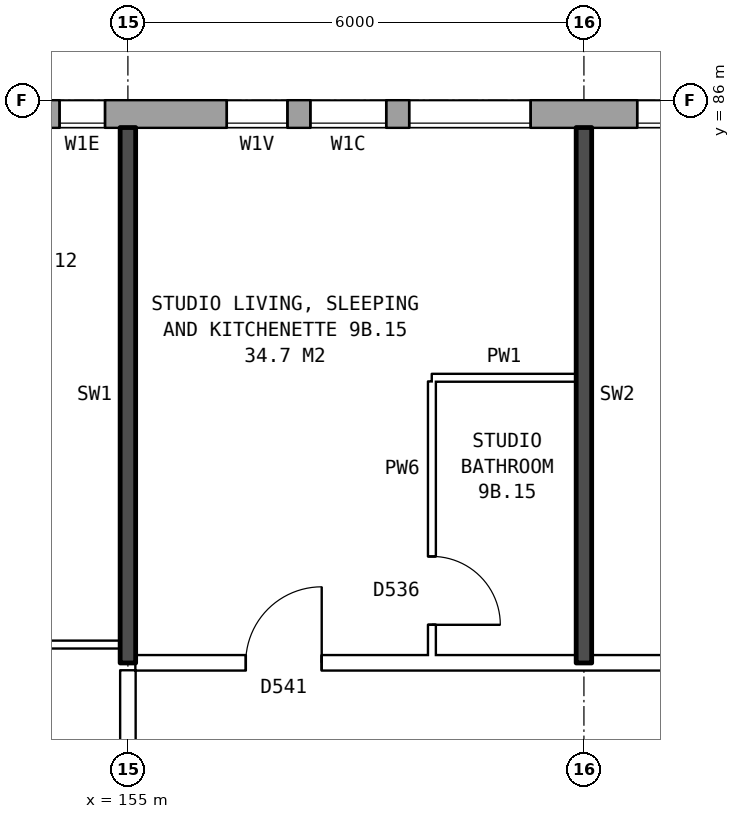
"""IFC4 building model, lengths in metres.
Left out: names, types, materials, properties, quantities, classifications, styles, units other than length and angle.
Written with IfcOpenShell. Run it as: python <this file> out.ifc"""

import sys

from ifc_helpers import new_model, si_unit, direction, frame, frame_2d, origin, place, context, subcontext, project, spatial, rectangle, extrude, element, fill, save


model = new_model("IFC4")
c1 = context("Model", 3, precision=1e-05, world=origin(), true_north=direction((0.0, 1.0)))
c2 = subcontext(c1, "Body", "Model", "MODEL_VIEW")
j1 = project(units=[si_unit("LENGTHUNIT", "METRE"), si_unit("PLANEANGLEUNIT", "RADIAN")], contexts=[c1])
p1 = place(None, origin())
s1 = spatial("IfcSite", under=j1, at=p1, CompositionType="ELEMENT")
p2 = place(p1, origin())
s2 = spatial("IfcBuilding", under=s1, at=p2, CompositionType="ELEMENT")
p3 = place(p2, frame((0.0, 0.0, 35.0)))
s3 = spatial("IfcBuildingStorey", under=s2, at=p3, CompositionType="ELEMENT", Elevation=35.0)
p4 = place(p3, frame((174.675, 85.82, 0.0), z_axis=(0.0, 0.0, 1.0), x_axis=(-1.0, 0.0, 0.0)))
e1 = element("IfcWall", 1, at=p4, inside=s3, PredefinedType="STANDARD", context=c2, shape_type="SweptSolid", body=[
    extrude(rectangle(XDim=40.601, YDim=0.36, at=frame_2d((20.3, 0.0))), origin(), (0.0, 0.0, 1.0), 2.85),
])
p5 = place(p4, frame((2.375, 0.0, 0.8)))
e2 = element("IfcOpeningElement", 2, at=p5, cuts=e1, PredefinedType="OPENING", context=c2, shape_type="SweptSolid", body=[
    extrude(rectangle(XDim=1.6, YDim=1.8, at=frame_2d((0.8, 0.9))), frame((0.0, 0.19, 0.0), z_axis=(0.0, -1.0, 0.0), x_axis=(1.0, 0.0, 0.0)), (0.0, 0.0, 1.0), 0.38),
])
p6 = place(p4, frame((5.375, 0.0, 0.8)))
e3 = element("IfcOpeningElement", 3, at=p6, cuts=e1, PredefinedType="OPENING", context=c2, shape_type="SweptSolid", body=[
    extrude(rectangle(XDim=1.6, YDim=1.8, at=frame_2d((0.8, 0.9))), frame((0.0, 0.19, 0.0), z_axis=(0.0, -1.0, 0.0), x_axis=(1.0, 0.0, 0.0)), (0.0, 0.0, 1.0), 0.38),
])
p7 = place(p4, frame((8.375, 0.0, 0.8)))
e4 = element("IfcOpeningElement", 4, at=p7, cuts=e1, PredefinedType="OPENING", context=c2, shape_type="SweptSolid", body=[
    extrude(rectangle(XDim=1.6, YDim=1.8, at=frame_2d((0.8, 0.9))), frame((0.0, 0.19, 0.0), z_axis=(0.0, -1.0, 0.0), x_axis=(1.0, 0.0, 0.0)), (0.0, 0.0, 1.0), 0.38),
])
p8 = place(p4, frame((11.375, 0.0, 0.8)))
e5 = element("IfcOpeningElement", 5, at=p8, cuts=e1, PredefinedType="OPENING", context=c2, shape_type="SweptSolid", body=[
    extrude(rectangle(XDim=1.6, YDim=1.8, at=frame_2d((0.8, 0.9))), frame((0.0, 0.19, 0.0), z_axis=(0.0, -1.0, 0.0), x_axis=(1.0, 0.0, 0.0)), (0.0, 0.0, 1.0), 0.38),
])
p9 = place(p4, frame((14.375, 0.0, 0.8)))
e6 = element("IfcOpeningElement", 6, at=p9, cuts=e1, PredefinedType="OPENING", context=c2, shape_type="SweptSolid", body=[
    extrude(rectangle(XDim=1.6, YDim=1.8, at=frame_2d((0.8, 0.9))), frame((0.0, 0.19, 0.0), z_axis=(0.0, -1.0, 0.0), x_axis=(1.0, 0.0, 0.0)), (0.0, 0.0, 1.0), 0.38),
])
p10 = place(p4, frame((16.275, 0.0, 0.8)))
e7 = element("IfcOpeningElement", 7, at=p10, cuts=e1, PredefinedType="OPENING", context=c2, shape_type="SweptSolid", body=[
    extrude(rectangle(XDim=1.0, YDim=1.8, at=frame_2d((0.5, 0.9))), frame((0.0, 0.19, 0.0), z_axis=(0.0, -1.0, 0.0), x_axis=(1.0, 0.0, 0.0)), (0.0, 0.0, 1.0), 0.38),
])
p11 = place(p4, frame((19.975, 0.0, 0.15)))
e8 = element("IfcOpeningElement", 8, at=p11, cuts=e1, PredefinedType="OPENING", context=c2, shape_type="SweptSolid", body=[
    extrude(rectangle(XDim=0.6, YDim=1.8, at=frame_2d((0.3, 0.9))), frame((0.0, 0.19, 0.0), z_axis=(0.0, -1.0, 0.0), x_axis=(1.0, 0.0, 0.0)), (0.0, 0.0, 1.0), 0.38),
])
p12 = place(p4, frame((23.375, 0.0, 0.8)))
e9 = element("IfcOpeningElement", 9, at=p12, cuts=e1, PredefinedType="OPENING", context=c2, shape_type="SweptSolid", body=[
    extrude(rectangle(XDim=1.6, YDim=1.8, at=frame_2d((0.8, 0.9))), frame((0.0, 0.19, 0.0), z_axis=(0.0, -1.0, 0.0), x_axis=(1.0, 0.0, 0.0)), (0.0, 0.0, 1.0), 0.38),
])
p13 = place(p4, frame((26.375, 0.0, 0.8)))
e10 = element("IfcOpeningElement", 10, at=p13, cuts=e1, PredefinedType="OPENING", context=c2, shape_type="SweptSolid", body=[
    extrude(rectangle(XDim=1.6, YDim=1.8, at=frame_2d((0.8, 0.9))), frame((0.0, 0.19, 0.0), z_axis=(0.0, -1.0, 0.0), x_axis=(1.0, 0.0, 0.0)), (0.0, 0.0, 1.0), 0.38),
])
p14 = place(p4, frame((29.375, 0.0, 0.8)))
e11 = element("IfcOpeningElement", 11, at=p14, cuts=e1, PredefinedType="OPENING", context=c2, shape_type="SweptSolid", body=[
    extrude(rectangle(XDim=1.6, YDim=1.8, at=frame_2d((0.8, 0.9))), frame((0.0, 0.19, 0.0), z_axis=(0.0, -1.0, 0.0), x_axis=(1.0, 0.0, 0.0)), (0.0, 0.0, 1.0), 0.38),
])
p15 = place(p4, frame((32.375, 0.0, 0.8)))
e12 = element("IfcOpeningElement", 12, at=p15, cuts=e1, PredefinedType="OPENING", context=c2, shape_type="SweptSolid", body=[
    extrude(rectangle(XDim=1.6, YDim=1.8, at=frame_2d((0.8, 0.9))), frame((0.0, 0.19, 0.0), z_axis=(0.0, -1.0, 0.0), x_axis=(1.0, 0.0, 0.0)), (0.0, 0.0, 1.0), 0.38),
])
p16 = place(p4, frame((35.375, 0.0, 0.8)))
e13 = element("IfcOpeningElement", 13, at=p16, cuts=e1, PredefinedType="OPENING", context=c2, shape_type="SweptSolid", body=[
    extrude(rectangle(XDim=1.6, YDim=1.8, at=frame_2d((0.8, 0.9))), frame((0.0, 0.19, 0.0), z_axis=(0.0, -1.0, 0.0), x_axis=(1.0, 0.0, 0.0)), (0.0, 0.0, 1.0), 0.38),
])
p17 = place(p4, frame((38.375, 0.0, 0.8)))
e14 = element("IfcOpeningElement", 14, at=p17, cuts=e1, PredefinedType="OPENING", context=c2, shape_type="SweptSolid", body=[
    extrude(rectangle(XDim=1.6, YDim=1.8, at=frame_2d((0.8, 0.9))), frame((0.0, 0.19, 0.0), z_axis=(0.0, -1.0, 0.0), x_axis=(1.0, 0.0, 0.0)), (0.0, 0.0, 1.0), 0.38),
])
p18 = place(p4, frame((17.575, 0.0, 1.7)))
e15 = element("IfcOpeningElement", 15, at=p18, cuts=e1, PredefinedType="OPENING", context=c2, shape_type="SweptSolid", body=[
    extrude(rectangle(XDim=0.8, YDim=0.9, at=frame_2d((0.4, 0.45))), frame((0.0, 0.19, 0.0), z_axis=(0.0, -1.0, 0.0), x_axis=(1.0, 0.0, 0.0)), (0.0, 0.0, 1.0), 0.38),
])
p19 = place(p4, frame((20.875, 0.0, 0.15)))
e16 = element("IfcOpeningElement", 16, at=p19, cuts=e1, PredefinedType="OPENING", context=c2, shape_type="SweptSolid", body=[
    extrude(rectangle(XDim=0.8, YDim=0.9, at=frame_2d((0.4, 0.45))), frame((0.0, 0.19, 0.0), z_axis=(0.0, -1.0, 0.0), x_axis=(1.0, 0.0, 0.0)), (0.0, 0.0, 1.0), 0.38),
])
p20 = place(p3, frame((155.1, 78.6, 0.0), z_axis=(0.0, 0.0, 1.0), x_axis=(1.0, 0.0, 0.0)))
e17 = element("IfcWall", 17, at=p20, inside=s3, PredefinedType="PARTITIONING", context=c2, shape_type="SweptSolid", body=[
    extrude(rectangle(XDim=22.29, YDim=0.2, at=frame_2d((11.145, 0.0))), origin(), (0.0, 0.0, 1.0), 2.85),
])
p21 = place(p20, frame((1.45, 0.0, 0.0)))
e18 = element("IfcOpeningElement", 18, at=p21, cuts=e17, PredefinedType="OPENING", context=c2, shape_type="SweptSolid", body=[
    extrude(rectangle(XDim=1.0, YDim=2.1, at=frame_2d((0.5, 1.05))), frame((0.0, 0.11, 0.0), z_axis=(0.0, -1.0, 0.0), x_axis=(1.0, 0.0, 0.0)), (0.0, 0.0, 1.0), 0.22),
])
p22 = place(p20, frame((7.4, 0.0, 0.0)))
e19 = element("IfcOpeningElement", 19, at=p22, cuts=e17, PredefinedType="OPENING", context=c2, shape_type="SweptSolid", body=[
    extrude(rectangle(XDim=1.0, YDim=2.1, at=frame_2d((0.5, 1.05))), frame((0.0, 0.11, 0.0), z_axis=(0.0, -1.0, 0.0), x_axis=(1.0, 0.0, 0.0)), (0.0, 0.0, 1.0), 0.22),
])
p23 = place(p20, frame((14.4, 0.0, 0.0)))
e20 = element("IfcOpeningElement", 20, at=p23, cuts=e17, PredefinedType="OPENING", context=c2, shape_type="SweptSolid", body=[
    extrude(rectangle(XDim=1.0, YDim=2.1, at=frame_2d((0.5, 1.05))), frame((0.0, 0.11, 0.0), z_axis=(0.0, -1.0, 0.0), x_axis=(1.0, 0.0, 0.0)), (0.0, 0.0, 1.0), 0.22),
])
p24 = place(p3, frame((152.0, 78.84, 0.0), z_axis=(0.0, 0.0, 1.0), x_axis=(1.0, 0.0, 0.0)))
e21 = element("IfcWall", 21, at=p24, inside=s3, PredefinedType="PARTITIONING", context=c2, shape_type="SweptSolid", body=[
    extrude(rectangle(XDim=2.9, YDim=0.1, at=frame_2d((1.45, 0.0))), origin(), (0.0, 0.0, 1.0), 2.85),
])
p25 = place(p24, frame((1.0, 0.0, 0.0)))
e22 = element("IfcOpeningElement", 22, at=p25, cuts=e21, PredefinedType="OPENING", context=c2, shape_type="SweptSolid", body=[
    extrude(rectangle(XDim=0.9, YDim=2.1, at=frame_2d((0.45, 1.05))), frame((0.0, 0.06, 0.0), z_axis=(0.0, -1.0, 0.0), x_axis=(1.0, 0.0, 0.0)), (0.0, 0.0, 1.0), 0.12),
])
p26 = place(p3, frame((159.0, 82.35, 0.0), z_axis=(0.0, 0.0, 1.0), x_axis=(1.0, 0.0, 0.0)))
e23 = element("IfcWall", 23, at=p26, inside=s3, PredefinedType="PARTITIONING", context=c2, shape_type="SweptSolid", body=[
    extrude(rectangle(XDim=1.9, YDim=0.1, at=frame_2d((0.95, 0.0))), origin(), (0.0, 0.0, 1.0), 2.85),
])
p27 = place(p3, frame((155.0, 76.3, 0.0), z_axis=(0.0, 0.0, 1.0), x_axis=(0.0, 1.0, 0.0)))
e24 = element("IfcWall", 24, at=p27, inside=s3, PredefinedType="PARTITIONING", context=c2, shape_type="SweptSolid", body=[
    extrude(rectangle(XDim=2.2, YDim=0.2, at=frame_2d((1.1, 0.0))), origin(), (0.0, 0.0, 1.0), 2.85),
])
p28 = place(p3, frame((155.0, 78.6, 0.0), z_axis=(0.0, 0.0, 1.0), x_axis=(0.0, 1.0, 0.0)))
e25 = element("IfcWall", 25, at=p28, inside=s3, PredefinedType="SOLIDWALL", context=c2, shape_type="SweptSolid", body=[
    extrude(rectangle(XDim=7.04, YDim=0.2, at=frame_2d((3.52, 0.0))), origin(), (0.0, 0.0, 1.0), 2.85),
])
p29 = place(p3, frame((159.0, 78.7, 0.0), z_axis=(0.0, 0.0, 1.0), x_axis=(0.0, 1.0, 0.0)))
e26 = element("IfcWall", 26, at=p29, inside=s3, PredefinedType="PARTITIONING", context=c2, shape_type="SweptSolid", body=[
    extrude(rectangle(XDim=3.6, YDim=0.1, at=frame_2d((1.8, 0.0))), origin(), (0.0, 0.0, 1.0), 2.85),
])
p30 = place(p29, frame((0.4, 0.0, 0.0)))
e27 = element("IfcOpeningElement", 27, at=p30, cuts=e26, PredefinedType="OPENING", context=c2, shape_type="SweptSolid", body=[
    extrude(rectangle(XDim=0.9, YDim=2.1, at=frame_2d((0.45, 1.05))), frame((0.0, 0.06, 0.0), z_axis=(0.0, -1.0, 0.0), x_axis=(1.0, 0.0, 0.0)), (0.0, 0.0, 1.0), 0.12),
])
p31 = place(p3, frame((161.0, 78.6, 0.0), z_axis=(0.0, 0.0, 1.0), x_axis=(0.0, 1.0, 0.0)))
e28 = element("IfcWall", 28, at=p31, inside=s3, PredefinedType="SOLIDWALL", context=c2, shape_type="SweptSolid", body=[
    extrude(rectangle(XDim=7.04, YDim=0.2, at=frame_2d((3.52, 0.0))), origin(), (0.0, 0.0, 1.0), 2.85),
])
p32 = place(p8, origin())
e29 = element("IfcWindow", 29, at=p32, inside=s3, PartitioningType="SINGLE_PANEL", PredefinedType="WINDOW", context=c2, shape_type="SweptSolid", body=[
    extrude(rectangle(XDim=1.6, YDim=1.8, at=frame_2d((0.8, 0.9))), frame((0.0, 0.15, 0.0), z_axis=(0.0, -1.0, 0.0), x_axis=(1.0, 0.0, 0.0)), (0.0, 0.0, 1.0), 0.06),
])
fill(e5, e29)
p33 = place(p9, origin())
e30 = element("IfcWindow", 30, at=p33, inside=s3, PartitioningType="SINGLE_PANEL", PredefinedType="WINDOW", context=c2, shape_type="SweptSolid", body=[
    extrude(rectangle(XDim=1.6, YDim=1.8, at=frame_2d((0.8, 0.9))), frame((0.0, 0.15, 0.0), z_axis=(0.0, -1.0, 0.0), x_axis=(1.0, 0.0, 0.0)), (0.0, 0.0, 1.0), 0.06),
])
fill(e6, e30)
p34 = place(p10, origin())
e31 = element("IfcWindow", 31, at=p34, inside=s3, PartitioningType="SINGLE_PANEL", PredefinedType="WINDOW", context=c2, shape_type="SweptSolid", body=[
    extrude(rectangle(XDim=1.0, YDim=1.8, at=frame_2d((0.5, 0.9))), frame((0.0, 0.15, 0.0), z_axis=(0.0, -1.0, 0.0), x_axis=(1.0, 0.0, 0.0)), (0.0, 0.0, 1.0), 0.06),
])
fill(e7, e31)
p35 = place(p11, origin())
e32 = element("IfcWindow", 32, at=p35, inside=s3, PartitioningType="SINGLE_PANEL", PredefinedType="WINDOW", context=c2, shape_type="SweptSolid", body=[
    extrude(rectangle(XDim=0.6, YDim=1.8, at=frame_2d((0.3, 0.9))), frame((0.0, 0.15, 0.0), z_axis=(0.0, -1.0, 0.0), x_axis=(1.0, 0.0, 0.0)), (0.0, 0.0, 1.0), 0.06),
])
fill(e8, e32)
p36 = place(p21, origin())
e33 = element("IfcDoor", 33, at=p36, inside=s3, OperationType="SINGLE_SWING_RIGHT", PredefinedType="DOOR", context=c2, shape_type="SweptSolid", body=[
    extrude(rectangle(XDim=1.0, YDim=2.1, at=frame_2d((0.5, 1.05))), frame((0.0, 0.025, 0.0), z_axis=(0.0, -1.0, 0.0), x_axis=(1.0, 0.0, 0.0)), (0.0, 0.0, 1.0), 0.05),
])
fill(e18, e33)
p37 = place(p30, frame((0.9, 0.0, 0.0), z_axis=(0.0, 0.0, 1.0), x_axis=(-1.0, 0.0, 0.0)))
e34 = element("IfcDoor", 34, at=p37, inside=s3, OperationType="SINGLE_SWING_RIGHT", PredefinedType="DOOR", context=c2, shape_type="SweptSolid", body=[
    extrude(rectangle(XDim=0.9, YDim=2.1, at=frame_2d((0.45, 1.05))), frame((0.0, 0.025, 0.0), z_axis=(0.0, -1.0, 0.0), x_axis=(1.0, 0.0, 0.0)), (0.0, 0.0, 1.0), 0.05),
])
fill(e27, e34)
p38 = place(p18, origin())
e35 = element("IfcWindow", 35, at=p38, inside=s3, PartitioningType="SINGLE_PANEL", PredefinedType="WINDOW", context=c2, shape_type="SweptSolid", body=[
    extrude(rectangle(XDim=0.8, YDim=0.9, at=frame_2d((0.4, 0.45))), frame((0.0, 0.15, 0.0), z_axis=(0.0, -1.0, 0.0), x_axis=(1.0, 0.0, 0.0)), (0.0, 0.0, 1.0), 0.06),
])
fill(e15, e35)
save(model, sys.argv[1])
